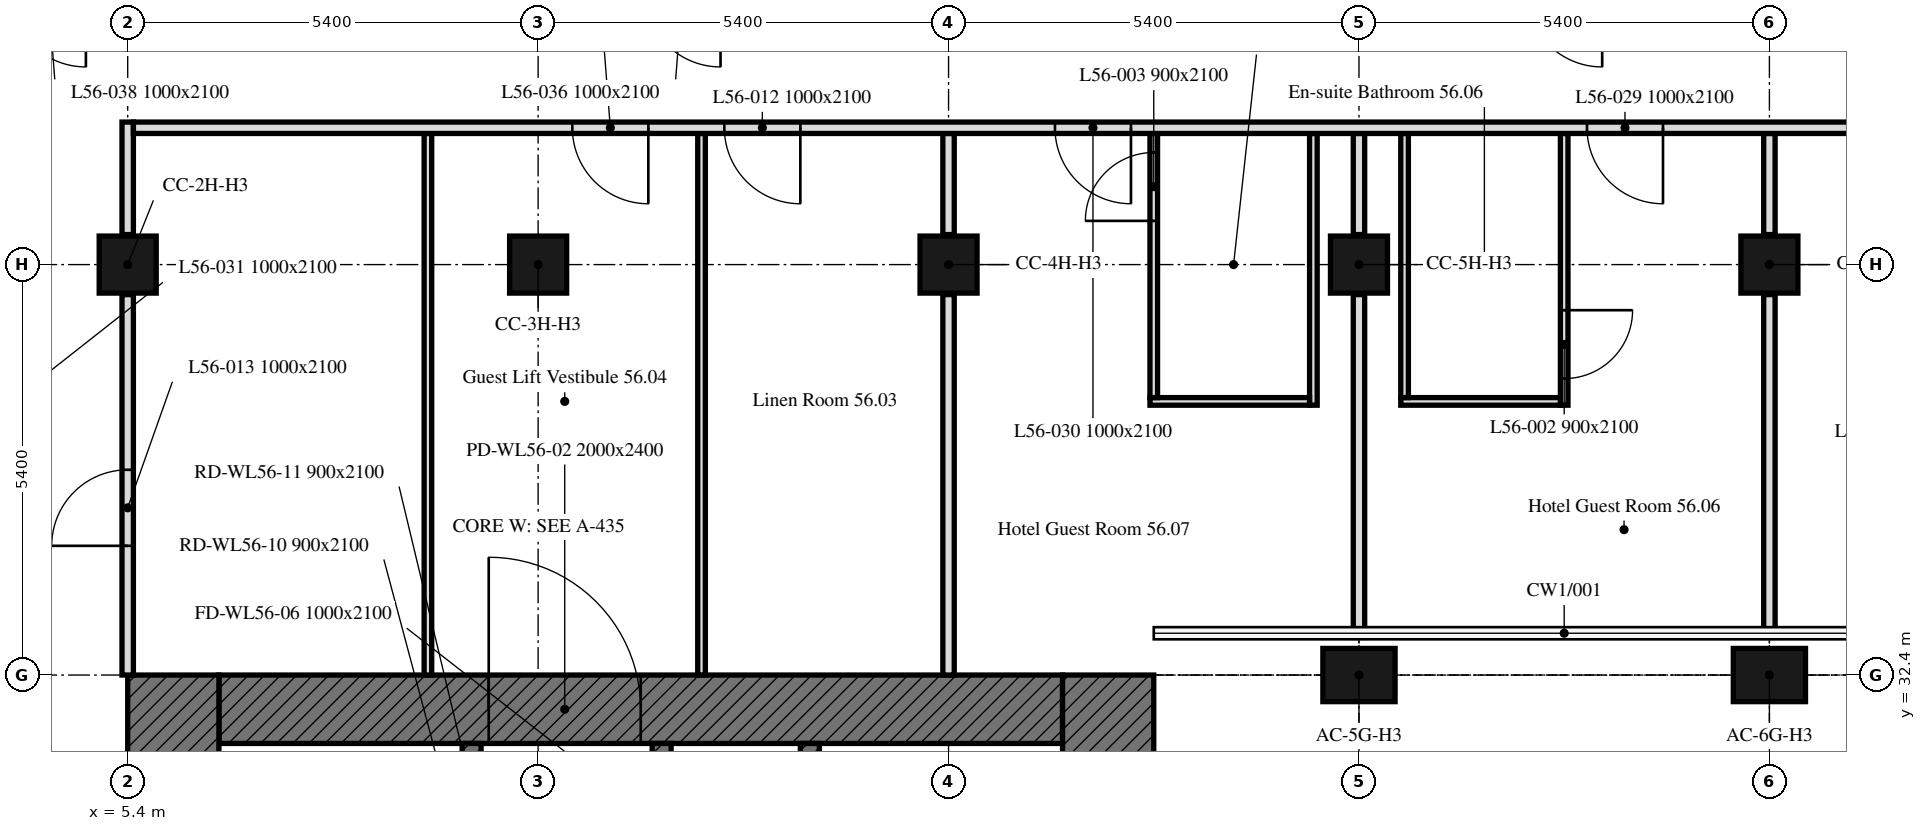
"""IFC4 building model, lengths in metres.
Left out: names, types, materials, properties, quantities, classifications, styles, units other than length and angle.
Written with IfcOpenShell. Run it as: python <this file> out.ifc"""

import sys

from ifc_helpers import new_model, si_unit, direction, frame, frame_2d, origin, origin_2d, place, context, subcontext, project, spatial, rectangle, extrude, element, fill, save


model = new_model("IFC4")
c1 = context("Model", 3, precision=1e-05, world=origin(), true_north=direction((0.0, 1.0)))
c2 = subcontext(c1, "Body", "Model", "MODEL_VIEW")
j1 = project(units=[si_unit("LENGTHUNIT", "METRE"), si_unit("PLANEANGLEUNIT", "RADIAN")], contexts=[c1])
p1 = place(None, origin())
s1 = spatial("IfcSite", under=j1, at=p1, CompositionType="ELEMENT")
p2 = place(p1, origin())
s2 = spatial("IfcBuilding", under=s1, at=p2, CompositionType="ELEMENT")
p3 = place(p2, frame((0.0, 0.0, 223.6)))
s3 = spatial("IfcBuildingStorey", under=s2, at=p3, CompositionType="ELEMENT", Elevation=223.6)
for number, where, z_axis, x_axis in (
    (1, (21.6, 32.4, 0.0), (0.0, 0.0, 1.0), (1.0, 0.0, 0.0)),
    (2, (27.0, 32.4, 0.0), (0.0, 0.0, 1.0), (1.0, 0.0, 0.0)),
):
    element("IfcColumn", number, at=place(p3, frame(where, z_axis=z_axis, x_axis=x_axis)), inside=s3, PredefinedType="COLUMN", context=c2, shape_type="SweptSolid", body=[
        extrude(rectangle(XDim=0.95, YDim=0.7, at=origin_2d()), origin(), (0.0, 0.0, 1.0), 3.0),
    ])
for number, where, z_axis, x_axis in (
    (3, (5.4, 37.8, 0.0), (0.0, 0.0, 1.0), (1.0, 0.0, 0.0)),
    (4, (10.8, 37.8, 0.0), (0.0, 0.0, 1.0), (1.0, 0.0, 0.0)),
    (5, (16.2, 37.8, 0.0), (0.0, 0.0, 1.0), (1.0, 0.0, 0.0)),
    (6, (21.6, 37.8, 0.0), (0.0, 0.0, 1.0), (1.0, 0.0, 0.0)),
    (7, (27.0, 37.8, 0.0), (0.0, 0.0, 1.0), (1.0, 0.0, 0.0)),
):
    element("IfcColumn", number, at=place(p3, frame(where, z_axis=z_axis, x_axis=x_axis)), inside=s3, PredefinedType="COLUMN", context=c2, shape_type="SweptSolid", body=[
        extrude(rectangle(XDim=0.75, YDim=0.75, at=origin_2d()), origin(), (0.0, 0.0, 1.0), 3.0),
    ])
p4 = place(p3, frame((6.6, 31.95, 0.0), z_axis=(0.0, 0.0, 1.0), x_axis=(1.0, 0.0, 0.0)))
e8 = element("IfcWall", 8, at=p4, inside=s3, PredefinedType="SOLIDWALL", context=c2, shape_type="SweptSolid", body=[
    extrude(rectangle(XDim=11.1, YDim=0.9, at=frame_2d((5.55, 0.0))), origin(), (0.0, 0.0, 1.0), 3.0),
])
p5 = place(p4, frame((3.55, 0.0, 0.0)))
e9 = element("IfcOpeningElement", 9, at=p5, cuts=e8, PredefinedType="OPENING", context=c2, shape_type="SweptSolid", body=[
    extrude(rectangle(XDim=2.0, YDim=2.4, at=frame_2d((1.0, 1.2))), frame((0.0, 0.45, 0.0), z_axis=(0.0, -1.0, 0.0), x_axis=(1.0, 0.0, 0.0)), (0.0, 0.0, 1.0), 0.9),
])
for number, where, z_axis, x_axis in (
    (10, (6.0, 16.2, 0.0), (0.0, 0.0, 1.0), (0.0, 1.0, 0.0)),
    (11, (18.3, 32.4, 0.0), (0.0, 0.0, 1.0), (0.0, -1.0, 0.0)),
):
    element("IfcWall", number, at=place(p3, frame(where, z_axis=z_axis, x_axis=x_axis)), inside=s3, PredefinedType="SOLIDWALL", context=c2, shape_type="SweptSolid", body=[
        extrude(rectangle(XDim=16.2, YDim=1.2, at=frame_2d((8.1, 0.0))), origin(), (0.0, 0.0, 1.0), 3.0),
    ])
p6 = place(p3, frame((9.925, 17.1, 0.0), z_axis=(0.0, 0.0, 1.0), x_axis=(0.0, 1.0, 0.0)))
e12 = element("IfcWall", 12, at=p6, inside=s3, PredefinedType="SOLIDWALL", context=c2, shape_type="SweptSolid", body=[
    extrude(rectangle(XDim=14.4, YDim=0.25, at=frame_2d((7.2, 0.0))), origin(), (0.0, 0.0, 1.0), 3.0),
])
p7 = place(p6, frame((4.6, 0.0, 0.0)))
e13 = element("IfcOpeningElement", 13, at=p7, cuts=e12, PredefinedType="OPENING", context=c2, shape_type="SweptSolid", body=[
    extrude(rectangle(XDim=1.0, YDim=2.1, at=frame_2d((0.5, 1.05))), frame((0.0, 0.125, 0.0), z_axis=(0.0, -1.0, 0.0), x_axis=(1.0, 0.0, 0.0)), (0.0, 0.0, 1.0), 0.25),
])
p8 = place(p6, frame((7.062, 0.0, 0.0)))
e14 = element("IfcOpeningElement", 14, at=p8, cuts=e12, PredefinedType="OPENING", context=c2, shape_type="SweptSolid", body=[
    extrude(rectangle(XDim=1.2, YDim=2.1, at=frame_2d((0.6, 1.05))), frame((0.0, 0.125, 0.0), z_axis=(0.0, -1.0, 0.0), x_axis=(1.0, 0.0, 0.0)), (0.0, 0.0, 1.0), 0.25),
])
p9 = place(p6, frame((10.106, 0.0, 0.0)))
e15 = element("IfcOpeningElement", 15, at=p9, cuts=e12, PredefinedType="OPENING", context=c2, shape_type="SweptSolid", body=[
    extrude(rectangle(XDim=0.9, YDim=2.1, at=frame_2d((0.45, 1.05))), frame((0.0, 0.125, 0.0), z_axis=(0.0, -1.0, 0.0), x_axis=(1.0, 0.0, 0.0)), (0.0, 0.0, 1.0), 0.25),
])
p10 = place(p6, frame((12.048, 0.0, 0.0)))
e16 = element("IfcOpeningElement", 16, at=p10, cuts=e12, PredefinedType="OPENING", context=c2, shape_type="SweptSolid", body=[
    extrude(rectangle(XDim=0.9, YDim=2.1, at=frame_2d((0.45, 1.05))), frame((0.0, 0.125, 0.0), z_axis=(0.0, -1.0, 0.0), x_axis=(1.0, 0.0, 0.0)), (0.0, 0.0, 1.0), 0.25),
])
p11 = place(p6, frame((13.354, 0.0, 0.0)))
e17 = element("IfcOpeningElement", 17, at=p11, cuts=e12, PredefinedType="OPENING", context=c2, shape_type="SweptSolid", body=[
    extrude(rectangle(XDim=0.9, YDim=2.1, at=frame_2d((0.45, 1.05))), frame((0.0, 0.125, 0.0), z_axis=(0.0, -1.0, 0.0), x_axis=(1.0, 0.0, 0.0)), (0.0, 0.0, 1.0), 0.25),
])
p12 = place(p3, frame((14.375, 17.1, 0.0), z_axis=(0.0, 0.0, 1.0), x_axis=(0.0, 1.0, 0.0)))
e18 = element("IfcWall", 18, at=p12, inside=s3, PredefinedType="SOLIDWALL", context=c2, shape_type="SweptSolid", body=[
    extrude(rectangle(XDim=14.4, YDim=0.25, at=frame_2d((7.2, 0.0))), origin(), (0.0, 0.0, 1.0), 3.0),
])
p13 = place(p12, frame((13.15, 0.0, 0.0)))
e19 = element("IfcOpeningElement", 19, at=p13, cuts=e18, PredefinedType="OPENING", context=c2, shape_type="SweptSolid", body=[
    extrude(rectangle(XDim=1.0, YDim=2.1, at=frame_2d((0.5, 1.05))), frame((0.0, 0.125, 0.0), z_axis=(0.0, -1.0, 0.0), x_axis=(1.0, 0.0, 0.0)), (0.0, 0.0, 1.0), 0.25),
])
p14 = place(p12, frame((0.6, 0.0, 0.0)))
e20 = element("IfcOpeningElement", 20, at=p14, cuts=e18, PredefinedType="OPENING", context=c2, shape_type="SweptSolid", body=[
    extrude(rectangle(XDim=1.1, YDim=2.1, at=frame_2d((0.55, 1.05))), frame((0.0, 0.125, 0.0), z_axis=(0.0, -1.0, 0.0), x_axis=(1.0, 0.0, 0.0)), (0.0, 0.0, 1.0), 0.25),
])
p15 = place(p12, frame((3.25, 0.0, 0.0)))
e21 = element("IfcOpeningElement", 21, at=p15, cuts=e18, PredefinedType="OPENING", context=c2, shape_type="SweptSolid", body=[
    extrude(rectangle(XDim=0.9, YDim=2.1, at=frame_2d((0.45, 1.05))), frame((0.0, 0.125, 0.0), z_axis=(0.0, -1.0, 0.0), x_axis=(1.0, 0.0, 0.0)), (0.0, 0.0, 1.0), 0.25),
])
p16 = place(p3, frame((12.425, 29.4, 0.0), z_axis=(0.0, 0.0, 1.0), x_axis=(0.0, 1.0, 0.0)))
e22 = element("IfcWall", 22, at=p16, inside=s3, PredefinedType="SOLIDWALL", context=c2, shape_type="SweptSolid", body=[
    extrude(rectangle(XDim=2.1, YDim=0.25, at=frame_2d((1.05, 0.0))), origin(), (0.0, 0.0, 1.0), 3.0),
])
p17 = place(p16, frame((0.5, 0.0, 0.0)))
e23 = element("IfcOpeningElement", 23, at=p17, cuts=e22, PredefinedType="OPENING", context=c2, shape_type="SweptSolid", body=[
    extrude(rectangle(XDim=1.0, YDim=2.1, at=frame_2d((0.5, 1.05))), frame((0.0, 0.125, 0.0), z_axis=(0.0, -1.0, 0.0), x_axis=(1.0, 0.0, 0.0)), (0.0, 0.0, 1.0), 0.25),
])
p18 = place(p3, frame((27.0, 39.525, 0.0), z_axis=(0.0, 0.0, 1.0), x_axis=(0.0, -1.0, 0.0)))
e24 = element("IfcWall", 24, at=p18, inside=s3, PredefinedType="PARTITIONING", context=c2, shape_type="SweptSolid", body=[
    extrude(rectangle(XDim=1.33, YDim=0.15, at=frame_2d((0.665, 0.0))), origin(), (0.0, 0.0, 1.0), 2.4),
])
p19 = place(p3, frame((27.0, 37.405, 0.0), z_axis=(0.0, 0.0, 1.0), x_axis=(0.0, -1.0, 0.0)))
e25 = element("IfcWall", 25, at=p19, inside=s3, PredefinedType="PARTITIONING", context=c2, shape_type="SweptSolid", body=[
    extrude(rectangle(XDim=4.51, YDim=0.15, at=frame_2d((2.255, 0.0))), origin(), (0.0, 0.0, 1.0), 2.4),
])
p20 = place(p3, frame((24.3, 39.525, 0.0), z_axis=(0.0, 0.0, 1.0), x_axis=(0.0, -1.0, 0.0)))
e26 = element("IfcWall", 26, at=p20, inside=s3, PredefinedType="PARTITIONING", context=c2, shape_type="SweptSolid", body=[
    extrude(rectangle(XDim=3.575, YDim=0.1, at=frame_2d((1.788, 0.0))), origin(), (0.0, 0.0, 1.0), 3.0),
])
p21 = place(p20, frame((2.325, 0.0, 0.0)))
e27 = element("IfcOpeningElement", 27, at=p21, cuts=e26, PredefinedType="OPENING", context=c2, shape_type="SweptSolid", body=[
    extrude(rectangle(XDim=0.9, YDim=2.1, at=frame_2d((0.45, 1.05))), frame((0.0, 0.05, 0.0), z_axis=(0.0, -1.0, 0.0), x_axis=(1.0, 0.0, 0.0)), (0.0, 0.0, 1.0), 0.1),
])
p22 = place(p3, frame((24.25, 36.0, 0.0), z_axis=(0.0, 0.0, 1.0), x_axis=(-1.0, 0.0, 0.0)))
e28 = element("IfcWall", 28, at=p22, inside=s3, PredefinedType="PARTITIONING", context=c2, shape_type="SweptSolid", body=[
    extrude(rectangle(XDim=2.1, YDim=0.1, at=frame_2d((1.05, 0.0))), origin(), (0.0, 0.0, 1.0), 3.0),
])
p23 = place(p3, frame((22.2, 36.05, 0.0), z_axis=(0.0, 0.0, 1.0), x_axis=(0.0, 1.0, 0.0)))
e29 = element("IfcWall", 29, at=p23, inside=s3, PredefinedType="PARTITIONING", context=c2, shape_type="SweptSolid", body=[
    extrude(rectangle(XDim=3.475, YDim=0.1, at=frame_2d((1.737, 0.0))), origin(), (0.0, 0.0, 1.0), 3.0),
])
p24 = place(p3, frame((21.6, 39.525, 0.0), z_axis=(0.0, 0.0, 1.0), x_axis=(0.0, -1.0, 0.0)))
e30 = element("IfcWall", 30, at=p24, inside=s3, PredefinedType="PARTITIONING", context=c2, shape_type="SweptSolid", body=[
    extrude(rectangle(XDim=1.33, YDim=0.15, at=frame_2d((0.665, 0.0))), origin(), (0.0, 0.0, 1.0), 2.4),
])
p25 = place(p3, frame((21.6, 37.405, 0.0), z_axis=(0.0, 0.0, 1.0), x_axis=(0.0, -1.0, 0.0)))
e31 = element("IfcWall", 31, at=p25, inside=s3, PredefinedType="PARTITIONING", context=c2, shape_type="SweptSolid", body=[
    extrude(rectangle(XDim=4.51, YDim=0.15, at=frame_2d((2.255, 0.0))), origin(), (0.0, 0.0, 1.0), 2.4),
])
p26 = place(p3, frame((21.0, 39.525, 0.0), z_axis=(0.0, 0.0, 1.0), x_axis=(0.0, -1.0, 0.0)))
e32 = element("IfcWall", 32, at=p26, inside=s3, PredefinedType="PARTITIONING", context=c2, shape_type="SweptSolid", body=[
    extrude(rectangle(XDim=3.575, YDim=0.1, at=frame_2d((1.788, 0.0))), origin(), (0.0, 0.0, 1.0), 3.0),
])
p27 = place(p3, frame((20.95, 36.0, 0.0), z_axis=(0.0, 0.0, 1.0), x_axis=(-1.0, 0.0, 0.0)))
e33 = element("IfcWall", 33, at=p27, inside=s3, PredefinedType="PARTITIONING", context=c2, shape_type="SweptSolid", body=[
    extrude(rectangle(XDim=2.1, YDim=0.1, at=frame_2d((1.05, 0.0))), origin(), (0.0, 0.0, 1.0), 3.0),
])
p28 = place(p3, frame((18.9, 36.05, 0.0), z_axis=(0.0, 0.0, 1.0), x_axis=(0.0, 1.0, 0.0)))
e34 = element("IfcWall", 34, at=p28, inside=s3, PredefinedType="PARTITIONING", context=c2, shape_type="SweptSolid", body=[
    extrude(rectangle(XDim=3.475, YDim=0.1, at=frame_2d((1.737, 0.0))), origin(), (0.0, 0.0, 1.0), 3.0),
])
p29 = place(p28, frame((2.325, 0.0, 0.0)))
e35 = element("IfcOpeningElement", 35, at=p29, cuts=e34, PredefinedType="OPENING", context=c2, shape_type="SweptSolid", body=[
    extrude(rectangle(XDim=0.9, YDim=2.1, at=frame_2d((0.45, 1.05))), frame((0.0, 0.05, 0.0), z_axis=(0.0, -1.0, 0.0), x_axis=(1.0, 0.0, 0.0)), (0.0, 0.0, 1.0), 0.1),
])
p30 = place(p3, frame((16.2, 39.525, 0.0), z_axis=(0.0, 0.0, 1.0), x_axis=(0.0, -1.0, 0.0)))
e36 = element("IfcWall", 36, at=p30, inside=s3, PredefinedType="PARTITIONING", context=c2, shape_type="SweptSolid", body=[
    extrude(rectangle(XDim=1.33, YDim=0.15, at=frame_2d((0.665, 0.0))), origin(), (0.0, 0.0, 1.0), 2.4),
])
p31 = place(p3, frame((16.2, 37.405, 0.0), z_axis=(0.0, 0.0, 1.0), x_axis=(0.0, -1.0, 0.0)))
e37 = element("IfcWall", 37, at=p31, inside=s3, PredefinedType="PARTITIONING", context=c2, shape_type="SweptSolid", body=[
    extrude(rectangle(XDim=5.005, YDim=0.15, at=frame_2d((2.502, 0.0))), origin(), (0.0, 0.0, 1.0), 2.4),
])
for number, where, z_axis, x_axis in (
    (38, (12.95, 32.4, 0.0), (0.0, 0.0, 1.0), (0.0, 1.0, 0.0)),
    (39, (9.35, 39.525, 0.0), (0.0, 0.0, 1.0), (0.0, -1.0, 0.0)),
):
    element("IfcWall", number, at=place(p3, frame(where, z_axis=z_axis, x_axis=x_axis)), inside=s3, PredefinedType="PARTITIONING", context=c2, shape_type="SweptSolid", body=[
        extrude(rectangle(XDim=7.125, YDim=0.1, at=frame_2d((3.562, 0.0))), origin(), (0.0, 0.0, 1.0), 2.4),
    ])
p32 = place(p3, frame((5.4, 32.4, 0.0), z_axis=(0.0, 0.0, 1.0), x_axis=(0.0, 1.0, 0.0)))
e40 = element("IfcWall", 40, at=p32, inside=s3, PredefinedType="PARTITIONING", context=c2, shape_type="SweptSolid", body=[
    extrude(rectangle(XDim=5.005, YDim=0.15, at=frame_2d((2.502, 0.0))), origin(), (0.0, 0.0, 1.0), 3.0),
])
p33 = place(p32, frame((1.7, 0.0, 0.0)))
e41 = element("IfcOpeningElement", 41, at=p33, cuts=e40, PredefinedType="OPENING", context=c2, shape_type="SweptSolid", body=[
    extrude(rectangle(XDim=1.0, YDim=2.1, at=frame_2d((0.5, 1.05))), frame((0.0, 0.075, 0.0), z_axis=(0.0, -1.0, 0.0), x_axis=(1.0, 0.0, 0.0)), (0.0, 0.0, 1.0), 0.15),
])
p34 = place(p3, frame((5.4, 38.195, 0.0), z_axis=(0.0, 0.0, 1.0), x_axis=(0.0, 1.0, 0.0)))
e42 = element("IfcWall", 42, at=p34, inside=s3, PredefinedType="PARTITIONING", context=c2, shape_type="SweptSolid", body=[
    extrude(rectangle(XDim=1.48, YDim=0.15, at=frame_2d((0.74, 0.0))), origin(), (0.0, 0.0, 1.0), 3.0),
])
p35 = place(p3, frame((41.374, 39.6, 0.0), z_axis=(0.0, 0.0, 1.0), x_axis=(-1.0, 0.0, 0.0)))
e43 = element("IfcWall", 43, at=p35, inside=s3, PredefinedType="PARTITIONING", context=c2, shape_type="SweptSolid", body=[
    extrude(rectangle(XDim=35.899, YDim=0.15, at=frame_2d((17.949, 0.0))), origin(), (0.0, 0.0, 1.0), 2.4),
])
p36 = place(p35, frame((0.25, 0.0, 0.0)))
e44 = element("IfcOpeningElement", 44, at=p36, cuts=e43, PredefinedType="OPENING", context=c2, shape_type="SweptSolid", body=[
    extrude(rectangle(XDim=1.0, YDim=2.1, at=frame_2d((0.5, 1.05))), frame((0.0, 0.075, 0.0), z_axis=(0.0, -1.0, 0.0), x_axis=(1.0, 0.0, 0.0)), (0.0, 0.0, 1.0), 0.15),
])
p37 = place(p35, frame((27.124, 0.0, 0.0)))
e45 = element("IfcOpeningElement", 45, at=p37, cuts=e43, PredefinedType="OPENING", context=c2, shape_type="SweptSolid", body=[
    extrude(rectangle(XDim=1.0, YDim=2.1, at=frame_2d((0.5, 1.05))), frame((0.0, 0.075, 0.0), z_axis=(0.0, -1.0, 0.0), x_axis=(1.0, 0.0, 0.0)), (0.0, 0.0, 1.0), 0.15),
])
p38 = place(p35, frame((6.024, 0.0, 0.0)))
e46 = element("IfcOpeningElement", 46, at=p38, cuts=e43, PredefinedType="OPENING", context=c2, shape_type="SweptSolid", body=[
    extrude(rectangle(XDim=1.0, YDim=2.1, at=frame_2d((0.5, 1.05))), frame((0.0, 0.075, 0.0), z_axis=(0.0, -1.0, 0.0), x_axis=(1.0, 0.0, 0.0)), (0.0, 0.0, 1.0), 0.15),
])
p39 = place(p35, frame((11.974, 0.0, 0.0)))
e47 = element("IfcOpeningElement", 47, at=p39, cuts=e43, PredefinedType="OPENING", context=c2, shape_type="SweptSolid", body=[
    extrude(rectangle(XDim=1.0, YDim=2.1, at=frame_2d((0.5, 1.05))), frame((0.0, 0.075, 0.0), z_axis=(0.0, -1.0, 0.0), x_axis=(1.0, 0.0, 0.0)), (0.0, 0.0, 1.0), 0.15),
])
p40 = place(p35, frame((15.774, 0.0, 0.0)))
e48 = element("IfcOpeningElement", 48, at=p40, cuts=e43, PredefinedType="OPENING", context=c2, shape_type="SweptSolid", body=[
    extrude(rectangle(XDim=1.0, YDim=2.1, at=frame_2d((0.5, 1.05))), frame((0.0, 0.075, 0.0), z_axis=(0.0, -1.0, 0.0), x_axis=(1.0, 0.0, 0.0)), (0.0, 0.0, 1.0), 0.15),
])
p41 = place(p35, frame((22.774, 0.0, 0.0)))
e49 = element("IfcOpeningElement", 49, at=p41, cuts=e43, PredefinedType="OPENING", context=c2, shape_type="SweptSolid", body=[
    extrude(rectangle(XDim=1.0, YDim=2.1, at=frame_2d((0.5, 1.05))), frame((0.0, 0.075, 0.0), z_axis=(0.0, -1.0, 0.0), x_axis=(1.0, 0.0, 0.0)), (0.0, 0.0, 1.0), 0.15),
])
p42 = place(p35, frame((3.754, 0.0, 0.0)))
e50 = element("IfcOpeningElement", 50, at=p42, cuts=e43, PredefinedType="OPENING", context=c2, shape_type="SweptSolid", body=[
    extrude(rectangle(XDim=1.8, YDim=2.4, at=frame_2d((0.9, 1.2))), frame((0.0, 0.075, 0.0), z_axis=(0.0, -1.0, 0.0), x_axis=(1.0, 0.0, 0.0)), (0.0, 0.0, 1.0), 0.15),
])
p43 = place(p35, frame((29.124, 0.0, 0.0)))
e51 = element("IfcOpeningElement", 51, at=p43, cuts=e43, PredefinedType="OPENING", context=c2, shape_type="SweptSolid", body=[
    extrude(rectangle(XDim=1.0, YDim=2.1, at=frame_2d((0.5, 1.05))), frame((0.0, 0.075, 0.0), z_axis=(0.0, -1.0, 0.0), x_axis=(1.0, 0.0, 0.0)), (0.0, 0.0, 1.0), 0.15),
])
p44 = place(p5, origin())
e52 = element("IfcDoor", 52, at=p44, inside=s3, OperationType="DOUBLE_DOOR_SINGLE_SWING", PredefinedType="DOOR", context=c2, shape_type="SweptSolid", body=[
    extrude(rectangle(XDim=2.0, YDim=2.4, at=frame_2d((1.0, 1.2))), frame((0.0, 0.025, 0.0), z_axis=(0.0, -1.0, 0.0), x_axis=(1.0, 0.0, 0.0)), (0.0, 0.0, 1.0), 0.05),
])
fill(e9, e52)
p45 = place(p21, origin())
e53 = element("IfcDoor", 53, at=p45, inside=s3, OperationType="SINGLE_SWING_RIGHT", PredefinedType="DOOR", context=c2, shape_type="SweptSolid", body=[
    extrude(rectangle(XDim=0.9, YDim=2.1, at=frame_2d((0.45, 1.05))), frame((0.0, 0.025, 0.0), z_axis=(0.0, -1.0, 0.0), x_axis=(1.0, 0.0, 0.0)), (0.0, 0.0, 1.0), 0.05),
])
fill(e27, e53)
p46 = place(p29, origin())
e54 = element("IfcDoor", 54, at=p46, inside=s3, OperationType="SINGLE_SWING_LEFT", PredefinedType="DOOR", context=c2, shape_type="SweptSolid", body=[
    extrude(rectangle(XDim=0.9, YDim=2.1, at=frame_2d((0.45, 1.05))), frame((0.0, 0.025, 0.0), z_axis=(0.0, -1.0, 0.0), x_axis=(1.0, 0.0, 0.0)), (0.0, 0.0, 1.0), 0.05),
])
fill(e35, e54)
p47 = place(p37, origin())
e55 = element("IfcDoor", 55, at=p47, inside=s3, OperationType="SINGLE_SWING_LEFT", PredefinedType="DOOR", context=c2, shape_type="SweptSolid", body=[
    extrude(rectangle(XDim=1.0, YDim=2.1, at=frame_2d((0.5, 1.05))), frame((0.0, 0.025, 0.0), z_axis=(0.0, -1.0, 0.0), x_axis=(1.0, 0.0, 0.0)), (0.0, 0.0, 1.0), 0.05),
])
fill(e45, e55)
p48 = place(p33, origin())
e56 = element("IfcDoor", 56, at=p48, inside=s3, OperationType="SINGLE_SWING_RIGHT", PredefinedType="DOOR", context=c2, shape_type="SweptSolid", body=[
    extrude(rectangle(XDim=1.0, YDim=2.1, at=frame_2d((0.5, 1.05))), frame((0.0, 0.025, 0.0), z_axis=(0.0, -1.0, 0.0), x_axis=(1.0, 0.0, 0.0)), (0.0, 0.0, 1.0), 0.05),
])
fill(e41, e56)
p49 = place(p40, origin())
e57 = element("IfcDoor", 57, at=p49, inside=s3, OperationType="SINGLE_SWING_RIGHT", PredefinedType="DOOR", context=c2, shape_type="SweptSolid", body=[
    extrude(rectangle(XDim=1.0, YDim=2.1, at=frame_2d((0.5, 1.05))), frame((0.0, 0.025, 0.0), z_axis=(0.0, -1.0, 0.0), x_axis=(1.0, 0.0, 0.0)), (0.0, 0.0, 1.0), 0.05),
])
fill(e48, e57)
p50 = place(p41, origin())
e58 = element("IfcDoor", 58, at=p50, inside=s3, OperationType="SINGLE_SWING_LEFT", PredefinedType="DOOR", context=c2, shape_type="SweptSolid", body=[
    extrude(rectangle(XDim=1.0, YDim=2.1, at=frame_2d((0.5, 1.05))), frame((0.0, 0.025, 0.0), z_axis=(0.0, -1.0, 0.0), x_axis=(1.0, 0.0, 0.0)), (0.0, 0.0, 1.0), 0.05),
])
fill(e49, e58)
p51 = place(p43, origin())
e59 = element("IfcDoor", 59, at=p51, inside=s3, OperationType="SINGLE_SWING_RIGHT", PredefinedType="DOOR", context=c2, shape_type="SweptSolid", body=[
    extrude(rectangle(XDim=1.0, YDim=2.1, at=frame_2d((0.5, 1.05))), frame((0.0, 0.025, 0.0), z_axis=(0.0, -1.0, 0.0), x_axis=(1.0, 0.0, 0.0)), (0.0, 0.0, 1.0), 0.05),
])
fill(e51, e59)
save(model, sys.argv[1])
